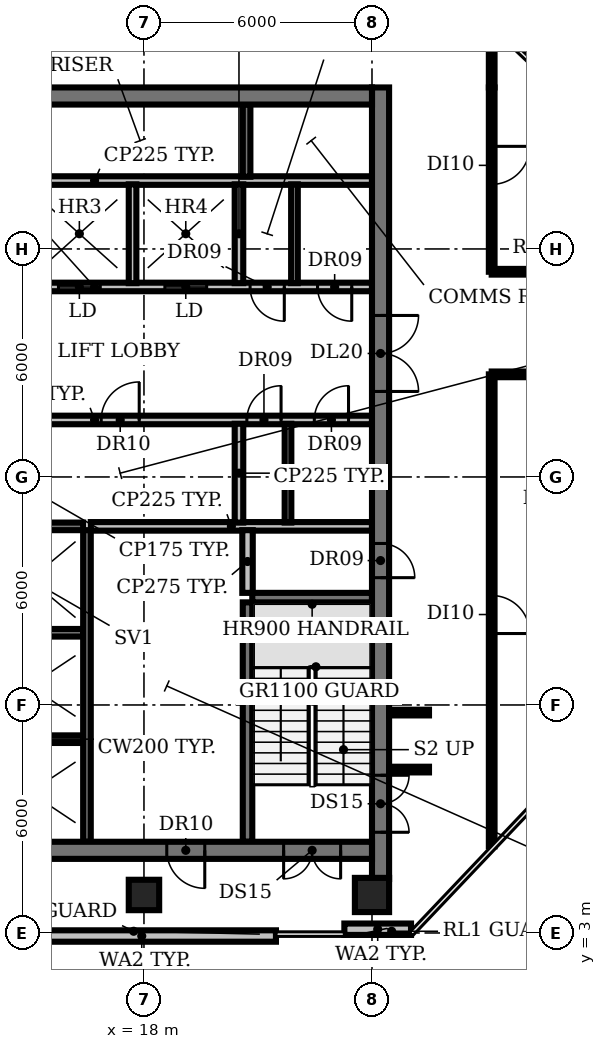
"""IFC4 building model, lengths in metres.
Left out: names, types, materials, properties, quantities, classifications, styles, units other than length and angle.
Written with IfcOpenShell. Run it as: python <this file> out.ifc"""

import sys

from ifc_helpers import new_model, si_unit, direction, frame, frame_2d, origin, origin_2d, place, context, subcontext, project, spatial, rectangle, circle, extrude, element, fill, save


model = new_model("IFC4")
c1 = context("Model", 3, precision=1e-05, world=origin(), true_north=direction((0.0, 1.0)))
c2 = subcontext(c1, "Body", "Model", "MODEL_VIEW")
j1 = project(units=[si_unit("LENGTHUNIT", "METRE"), si_unit("PLANEANGLEUNIT", "RADIAN")], contexts=[c1])
p1 = place(None, origin())
s1 = spatial("IfcSite", under=j1, at=p1, CompositionType="ELEMENT")
p2 = place(p1, origin())
s2 = spatial("IfcBuilding", under=s1, at=p2, CompositionType="ELEMENT")
p3 = place(p2, frame((0.0, 0.0, 222.2)))
s3 = spatial("IfcBuildingStorey", under=s2, at=p3, CompositionType="ELEMENT", Elevation=222.2)
p4 = place(p3, frame((18.0, 4.0, 0.0), z_axis=(0.0, 0.0, 1.0), x_axis=(1.0, 0.0, 0.0)))
e1 = element("IfcColumn", 1, at=p4, inside=s3, PredefinedType="COLUMN", context=c2, shape_type="SweptSolid", body=[
    extrude(rectangle(XDim=0.8, YDim=0.8, at=origin_2d()), origin(), (0.0, 0.0, 1.0), 3.85),
])
p5 = place(p3, frame((24.0, 4.0, 0.0), z_axis=(0.0, 0.0, 1.0), x_axis=(1.0, 0.0, 0.0)))
e2 = element("IfcColumn", 2, at=p5, inside=s3, PredefinedType="COLUMN", context=c2, shape_type="SweptSolid", body=[
    extrude(circle(Radius=0.45, at=origin_2d()), origin(), (0.0, 0.0, 1.0), 3.85),
])
p6 = place(p3, frame((14.41, 2.92, 0.0), z_axis=(0.0, 0.0, 1.0), x_axis=(1.0, 0.0, 0.0)))
e3 = element("IfcWall", 3, at=p6, inside=s3, PredefinedType="SOLIDWALL", context=c2, shape_type="SweptSolid", body=[
    extrude(rectangle(XDim=7.063, YDim=0.3, at=frame_2d((3.531, 0.0))), origin(), (0.0, 0.0, 1.0), 3.85),
])
p7 = place(p3, frame((23.273, 3.099, 0.0), z_axis=(0.0, 0.0, 1.0), x_axis=(1.0, 0.0, 0.0)))
e4 = element("IfcWall", 4, at=p7, inside=s3, PredefinedType="SOLIDWALL", context=c2, shape_type="SweptSolid", body=[
    extrude(rectangle(XDim=1.754, YDim=0.3, at=frame_2d((0.877, 0.0))), origin(), (0.0, 0.0, 1.0), 3.85),
])
for number, where, z_axis, x_axis in (
    (5, (13.6, 8.1, 0.0), (0.0, 0.0, 1.0), (1.0, 0.0, 0.0)),
    (6, (13.6, 10.9, 0.0), (0.0, 0.0, 1.0), (1.0, 0.0, 0.0)),
):
    element("IfcWall", number, at=place(p3, frame(where, z_axis=z_axis, x_axis=x_axis)), inside=s3, PredefinedType="SHEAR", context=c2, shape_type="SweptSolid", body=[
        extrude(rectangle(XDim=2.8, YDim=0.2, at=frame_2d((1.4, 0.0))), origin(), (0.0, 0.0, 1.0), 3.85),
    ])
p8 = place(p3, frame((20.85, 11.825, 0.0), z_axis=(0.0, 0.0, 1.0), x_axis=(1.0, 0.0, 0.0)))
e7 = element("IfcWall", 7, at=p8, inside=s3, PredefinedType="SHEAR", context=c2, shape_type="SweptSolid", body=[
    extrude(rectangle(XDim=3.15, YDim=0.25, at=frame_2d((1.575, 0.0))), origin(), (0.0, 0.0, 1.0), 3.85),
])
p9 = place(p3, frame((13.6, 13.7, 0.0), z_axis=(0.0, 0.0, 1.0), x_axis=(1.0, 0.0, 0.0)))
e8 = element("IfcWall", 8, at=p9, inside=s3, PredefinedType="SHEAR", context=c2, shape_type="SweptSolid", body=[
    extrude(rectangle(XDim=2.8, YDim=0.2, at=frame_2d((1.4, 0.0))), origin(), (0.0, 0.0, 1.0), 3.85),
])
p10 = place(p3, frame((16.6, 13.7, 0.0), z_axis=(0.0, 0.0, 1.0), x_axis=(1.0, 0.0, 0.0)))
e9 = element("IfcWall", 9, at=p10, inside=s3, PredefinedType="PARTITIONING", context=c2, shape_type="SweptSolid", body=[
    extrude(rectangle(XDim=7.4, YDim=0.225, at=frame_2d((3.7, 0.0))), origin(), (0.0, 0.0, 1.0), 3.85),
])
p11 = place(p3, frame((9.4, 16.5, 0.0), z_axis=(0.0, 0.0, 1.0), x_axis=(1.0, 0.0, 0.0)))
e10 = element("IfcWall", 10, at=p11, inside=s3, PredefinedType="PARTITIONING", context=c2, shape_type="SweptSolid", body=[
    extrude(rectangle(XDim=14.6, YDim=0.225, at=frame_2d((7.3, 0.0))), origin(), (0.0, 0.0, 1.0), 3.85),
])
p12 = place(p11, frame((1.9, 0.0, 0.0)))
e11 = element("IfcOpeningElement", 11, at=p12, cuts=e10, PredefinedType="OPENING", context=c2, shape_type="SweptSolid", body=[
    extrude(rectangle(XDim=1.0, YDim=2.1, at=frame_2d((0.5, 1.05))), frame((0.0, 0.123, 0.0), z_axis=(0.0, -1.0, 0.0), x_axis=(1.0, 0.0, 0.0)), (0.0, 0.0, 1.0), 0.245),
])
p13 = place(p11, frame((7.475, 0.0, 0.0)))
e12 = element("IfcOpeningElement", 12, at=p13, cuts=e10, PredefinedType="OPENING", context=c2, shape_type="SweptSolid", body=[
    extrude(rectangle(XDim=1.0, YDim=2.1, at=frame_2d((0.5, 1.05))), frame((0.0, 0.123, 0.0), z_axis=(0.0, -1.0, 0.0), x_axis=(1.0, 0.0, 0.0)), (0.0, 0.0, 1.0), 0.245),
])
p14 = place(p11, frame((11.308, 0.0, 0.0)))
e13 = element("IfcOpeningElement", 13, at=p14, cuts=e10, PredefinedType="OPENING", context=c2, shape_type="SweptSolid", body=[
    extrude(rectangle(XDim=0.9, YDim=2.1, at=frame_2d((0.45, 1.05))), frame((0.0, 0.123, 0.0), z_axis=(0.0, -1.0, 0.0), x_axis=(1.0, 0.0, 0.0)), (0.0, 0.0, 1.0), 0.245),
])
p15 = place(p11, frame((13.083, 0.0, 0.0)))
e14 = element("IfcOpeningElement", 14, at=p15, cuts=e10, PredefinedType="OPENING", context=c2, shape_type="SweptSolid", body=[
    extrude(rectangle(XDim=0.9, YDim=2.1, at=frame_2d((0.45, 1.05))), frame((0.0, 0.123, 0.0), z_axis=(0.0, -1.0, 0.0), x_axis=(1.0, 0.0, 0.0)), (0.0, 0.0, 1.0), 0.245),
])
p16 = place(p3, frame((24.0, 20.0, 0.0), z_axis=(0.0, 0.0, 1.0), x_axis=(-1.0, 0.0, 0.0)))
e15 = element("IfcWall", 15, at=p16, inside=s3, PredefinedType="PARTITIONING", context=c2, shape_type="SweptSolid", body=[
    extrude(rectangle(XDim=14.6, YDim=0.225, at=frame_2d((7.3, 0.0))), origin(), (0.0, 0.0, 1.0), 3.85),
])
p17 = place(p16, frame((12.75, 0.0, 0.0)))
e16 = element("IfcOpeningElement", 16, at=p17, cuts=e15, PredefinedType="OPENING", context=c2, shape_type="SweptSolid", body=[
    extrude(rectangle(XDim=1.1, YDim=2.1, at=frame_2d((0.55, 1.05))), frame((0.0, 0.123, 0.0), z_axis=(0.0, -1.0, 0.0), x_axis=(1.0, 0.0, 0.0)), (0.0, 0.0, 1.0), 0.245),
])
p18 = place(p16, frame((9.95, 0.0, 0.0)))
e17 = element("IfcOpeningElement", 17, at=p18, cuts=e15, PredefinedType="OPENING", context=c2, shape_type="SweptSolid", body=[
    extrude(rectangle(XDim=1.1, YDim=2.1, at=frame_2d((0.55, 1.05))), frame((0.0, 0.123, 0.0), z_axis=(0.0, -1.0, 0.0), x_axis=(1.0, 0.0, 0.0)), (0.0, 0.0, 1.0), 0.245),
])
p19 = place(p16, frame((7.15, 0.0, 0.0)))
e18 = element("IfcOpeningElement", 18, at=p19, cuts=e15, PredefinedType="OPENING", context=c2, shape_type="SweptSolid", body=[
    extrude(rectangle(XDim=1.1, YDim=2.1, at=frame_2d((0.55, 1.05))), frame((0.0, 0.123, 0.0), z_axis=(0.0, -1.0, 0.0), x_axis=(1.0, 0.0, 0.0)), (0.0, 0.0, 1.0), 0.245),
])
p20 = place(p16, frame((4.35, 0.0, 0.0)))
e19 = element("IfcOpeningElement", 19, at=p20, cuts=e15, PredefinedType="OPENING", context=c2, shape_type="SweptSolid", body=[
    extrude(rectangle(XDim=1.1, YDim=2.1, at=frame_2d((0.55, 1.05))), frame((0.0, 0.123, 0.0), z_axis=(0.0, -1.0, 0.0), x_axis=(1.0, 0.0, 0.0)), (0.0, 0.0, 1.0), 0.245),
])
p21 = place(p16, frame((2.308, 0.0, 0.0)))
e20 = element("IfcOpeningElement", 20, at=p21, cuts=e15, PredefinedType="OPENING", context=c2, shape_type="SweptSolid", body=[
    extrude(rectangle(XDim=0.9, YDim=2.1, at=frame_2d((0.45, 1.05))), frame((0.0, 0.123, 0.0), z_axis=(0.0, -1.0, 0.0), x_axis=(1.0, 0.0, 0.0)), (0.0, 0.0, 1.0), 0.245),
])
p22 = place(p16, frame((0.532, 0.0, 0.0)))
e21 = element("IfcOpeningElement", 21, at=p22, cuts=e15, PredefinedType="OPENING", context=c2, shape_type="SweptSolid", body=[
    extrude(rectangle(XDim=0.9, YDim=2.1, at=frame_2d((0.45, 1.05))), frame((0.0, 0.123, 0.0), z_axis=(0.0, -1.0, 0.0), x_axis=(1.0, 0.0, 0.0)), (0.0, 0.0, 1.0), 0.245),
])
p23 = place(p3, frame((9.4, 22.8, 0.0), z_axis=(0.0, 0.0, 1.0), x_axis=(1.0, 0.0, 0.0)))
e22 = element("IfcWall", 22, at=p23, inside=s3, PredefinedType="PARTITIONING", context=c2, shape_type="SweptSolid", body=[
    extrude(rectangle(XDim=14.6, YDim=0.225, at=frame_2d((7.3, 0.0))), origin(), (0.0, 0.0, 1.0), 3.85),
])
p24 = place(p3, frame((16.5, 5.4, 0.0), z_axis=(0.0, 0.0, 1.0), x_axis=(0.0, 1.0, 0.0)))
e23 = element("IfcWall", 23, at=p24, inside=s3, PredefinedType="SHEAR", context=c2, shape_type="SweptSolid", body=[
    extrude(rectangle(XDim=8.2, YDim=0.2, at=frame_2d((4.1, 0.0))), origin(), (0.0, 0.0, 1.0), 3.85),
])
p25 = place(p3, frame((17.7, 20.1, 0.0), z_axis=(0.0, 0.0, 1.0), x_axis=(0.0, 1.0, 0.0)))
e24 = element("IfcWall", 24, at=p25, inside=s3, PredefinedType="SOLIDWALL", context=c2, shape_type="SweptSolid", body=[
    extrude(rectangle(XDim=2.6, YDim=0.2, at=frame_2d((1.3, 0.0))), origin(), (0.0, 0.0, 1.0), 3.85),
])
for number, where, z_axis, x_axis in (
    (25, (20.5, 13.8, 0.0), (0.0, 0.0, 1.0), (0.0, 1.0, 0.0)),
    (26, (20.5, 20.1, 0.0), (0.0, 0.0, 1.0), (0.0, 1.0, 0.0)),
):
    element("IfcWall", number, at=place(p3, frame(where, z_axis=z_axis, x_axis=x_axis)), inside=s3, PredefinedType="PARTITIONING", context=c2, shape_type="SweptSolid", body=[
        extrude(rectangle(XDim=2.6, YDim=0.225, at=frame_2d((1.3, 0.0))), origin(), (0.0, 0.0, 1.0), 3.85),
    ])
p26 = place(p3, frame((20.7, 22.9, 0.0), z_axis=(0.0, 0.0, 1.0), x_axis=(0.0, 1.0, 0.0)))
e27 = element("IfcWall", 27, at=p26, inside=s3, PredefinedType="SHEAR", context=c2, shape_type="SweptSolid", body=[
    extrude(rectangle(XDim=1.9, YDim=0.2, at=frame_2d((0.95, 0.0))), origin(), (0.0, 0.0, 1.0), 3.85),
])
p27 = place(p3, frame((20.725, 5.4, 0.0), z_axis=(0.0, 0.0, 1.0), x_axis=(0.0, 1.0, 0.0)))
e28 = element("IfcWall", 28, at=p27, inside=s3, PredefinedType="SHEAR", context=c2, shape_type="SweptSolid", body=[
    extrude(rectangle(XDim=6.3, YDim=0.25, at=frame_2d((3.15, 0.0))), origin(), (0.0, 0.0, 1.0), 3.85),
])
p28 = place(p3, frame((20.725, 11.95, 0.0), z_axis=(0.0, 0.0, 1.0), x_axis=(0.0, 1.0, 0.0)))
e29 = element("IfcWall", 29, at=p28, inside=s3, PredefinedType="PARTITIONING", context=c2, shape_type="SweptSolid", body=[
    extrude(rectangle(XDim=1.65, YDim=0.275, at=frame_2d((0.825, 0.0))), origin(), (0.0, 0.0, 1.0), 3.85),
])
for number, where, z_axis, x_axis in (
    (30, (21.79, 13.8, 0.0), (0.0, 0.0, 1.0), (0.0, 1.0, 0.0)),
    (31, (21.96, 20.1, 0.0), (0.0, 0.0, 1.0), (0.0, 1.0, 0.0)),
):
    element("IfcWall", number, at=place(p3, frame(where, z_axis=z_axis, x_axis=x_axis)), inside=s3, PredefinedType="PARTITIONING", context=c2, shape_type="SweptSolid", body=[
        extrude(rectangle(XDim=2.6, YDim=0.175, at=frame_2d((1.3, 0.0))), origin(), (0.0, 0.0, 1.0), 3.85),
    ])
p29 = place(p3, frame((24.225, 25.25, 0.0), z_axis=(0.0, 0.0, 1.0), x_axis=(0.0, -1.0, 0.0)))
e32 = element("IfcWall", 32, at=p29, inside=s3, PredefinedType="SHEAR", context=c2, shape_type="SweptSolid", body=[
    extrude(rectangle(XDim=20.83, YDim=0.45, at=frame_2d((10.415, 0.0))), origin(), (0.0, 0.0, 1.0), 3.85),
])
p30 = place(p29, frame((18.1, 0.0, 0.0)))
e33 = element("IfcOpeningElement", 33, at=p30, cuts=e32, PredefinedType="OPENING", context=c2, shape_type="SweptSolid", body=[
    extrude(rectangle(XDim=1.5, YDim=2.1, at=frame_2d((0.75, 1.05))), frame((0.0, 0.235, 0.0), z_axis=(0.0, -1.0, 0.0), x_axis=(1.0, 0.0, 0.0)), (0.0, 0.0, 1.0), 0.47),
])
p31 = place(p29, frame((12.0, 0.0, 0.0)))
e34 = element("IfcOpeningElement", 34, at=p31, cuts=e32, PredefinedType="OPENING", context=c2, shape_type="SweptSolid", body=[
    extrude(rectangle(XDim=0.9, YDim=2.1, at=frame_2d((0.45, 1.05))), frame((0.0, 0.235, 0.0), z_axis=(0.0, -1.0, 0.0), x_axis=(1.0, 0.0, 0.0)), (0.0, 0.0, 1.0), 0.47),
])
p32 = place(p29, frame((6.0, 0.0, 0.0)))
e35 = element("IfcOpeningElement", 35, at=p32, cuts=e32, PredefinedType="OPENING", context=c2, shape_type="SweptSolid", body=[
    extrude(rectangle(XDim=2.0, YDim=2.1, at=frame_2d((1.0, 1.05))), frame((0.0, 0.235, 0.0), z_axis=(0.0, -1.0, 0.0), x_axis=(1.0, 0.0, 0.0)), (0.0, 0.0, 1.0), 0.47),
])
p33 = place(p3, frame((24.0, 5.175, 0.0), z_axis=(0.0, 0.0, 1.0), x_axis=(-1.0, 0.0, 0.0)))
e36 = element("IfcWall", 36, at=p33, inside=s3, PredefinedType="SHEAR", context=c2, shape_type="SweptSolid", body=[
    extrude(rectangle(XDim=18.0, YDim=0.45, at=frame_2d((9.0, 0.0))), origin(), (0.0, 0.0, 1.0), 3.85),
])
p34 = place(p33, frame((0.825, 0.0, 0.0)))
e37 = element("IfcOpeningElement", 37, at=p34, cuts=e36, PredefinedType="OPENING", context=c2, shape_type="SweptSolid", body=[
    extrude(rectangle(XDim=1.5, YDim=2.1, at=frame_2d((0.75, 1.05))), frame((0.0, 0.235, 0.0), z_axis=(0.0, -1.0, 0.0), x_axis=(1.0, 0.0, 0.0)), (0.0, 0.0, 1.0), 0.47),
])
p35 = place(p33, frame((15.675, 0.0, 0.0)))
e38 = element("IfcOpeningElement", 38, at=p35, cuts=e36, PredefinedType="OPENING", context=c2, shape_type="SweptSolid", body=[
    extrude(rectangle(XDim=1.5, YDim=2.1, at=frame_2d((0.75, 1.05))), frame((0.0, 0.235, 0.0), z_axis=(0.0, -1.0, 0.0), x_axis=(1.0, 0.0, 0.0)), (0.0, 0.0, 1.0), 0.47),
])
p36 = place(p33, frame((13.0, 0.0, 0.0)))
e39 = element("IfcOpeningElement", 39, at=p36, cuts=e36, PredefinedType="OPENING", context=c2, shape_type="SweptSolid", body=[
    extrude(rectangle(XDim=1.2, YDim=2.1, at=frame_2d((0.6, 1.05))), frame((0.0, 0.235, 0.0), z_axis=(0.0, -1.0, 0.0), x_axis=(1.0, 0.0, 0.0)), (0.0, 0.0, 1.0), 0.47),
])
p37 = place(p33, frame((4.4, 0.0, 0.0)))
e40 = element("IfcOpeningElement", 40, at=p37, cuts=e36, PredefinedType="OPENING", context=c2, shape_type="SweptSolid", body=[
    extrude(rectangle(XDim=1.0, YDim=2.1, at=frame_2d((0.5, 1.05))), frame((0.0, 0.235, 0.0), z_axis=(0.0, -1.0, 0.0), x_axis=(1.0, 0.0, 0.0)), (0.0, 0.0, 1.0), 0.47),
])
p38 = place(p3, frame((6.0, 25.025, 0.0), z_axis=(0.0, 0.0, 1.0), x_axis=(1.0, 0.0, 0.0)))
e41 = element("IfcWall", 41, at=p38, inside=s3, PredefinedType="SHEAR", context=c2, shape_type="SweptSolid", body=[
    extrude(rectangle(XDim=18.0, YDim=0.45, at=frame_2d((9.0, 0.0))), origin(), (0.0, 0.0, 1.0), 3.85),
])
for number, where, z_axis, x_axis in (
    (42, (24.45, 7.3, 0.0), (0.0, 0.0, 1.0), (1.0, 0.0, 0.0)),
    (43, (24.45, 8.8, 0.0), (0.0, 0.0, 1.0), (1.0, 0.0, 0.0)),
):
    element("IfcWall", number, at=place(p3, frame(where, z_axis=z_axis, x_axis=x_axis)), inside=s3, PredefinedType="PARTITIONING", context=c2, shape_type="SweptSolid", body=[
        extrude(rectangle(XDim=1.05, YDim=0.15, at=frame_2d((0.525, 0.0))), origin(), (0.0, 0.0, 1.0), 2.88),
    ])
p39 = place(p3, frame((27.15, 17.7, 0.0), z_axis=(0.0, 0.0, 1.0), x_axis=(0.0, -1.0, 0.0)))
e44 = element("IfcWall", 44, at=p39, inside=s3, PredefinedType="PARTITIONING", context=c2, shape_type="SweptSolid", body=[
    extrude(rectangle(XDim=12.42, YDim=0.15, at=frame_2d((6.21, 0.0))), origin(), (0.0, 0.0, 1.0), 2.88),
])
p40 = place(p39, frame((5.82, 0.0, 0.0)))
e45 = element("IfcOpeningElement", 45, at=p40, cuts=e44, PredefinedType="OPENING", context=c2, shape_type="SweptSolid", body=[
    extrude(rectangle(XDim=1.0, YDim=2.1, at=frame_2d((0.5, 1.05))), frame((0.0, 0.085, 0.0), z_axis=(0.0, -1.0, 0.0), x_axis=(1.0, 0.0, 0.0)), (0.0, 0.0, 1.0), 0.17),
])
p41 = place(p3, frame((27.15, 17.7, 0.0), z_axis=(0.0, 0.0, 1.0), x_axis=(1.0, 0.0, 0.0)))
e46 = element("IfcWall", 46, at=p41, inside=s3, PredefinedType="PARTITIONING", context=c2, shape_type="SweptSolid", body=[
    extrude(rectangle(XDim=4.435, YDim=0.15, at=frame_2d((2.218, 0.0))), origin(), (0.0, 0.0, 1.0), 2.88),
])
p42 = place(p3, frame((27.15, 20.4, 0.0), z_axis=(0.0, 0.0, 1.0), x_axis=(1.0, 0.0, 0.0)))
e47 = element("IfcWall", 47, at=p42, inside=s3, PredefinedType="PARTITIONING", context=c2, shape_type="SweptSolid", body=[
    extrude(rectangle(XDim=4.236, YDim=0.15, at=frame_2d((2.118, 0.0))), origin(), (0.0, 0.0, 1.0), 2.88),
])
p43 = place(p3, frame((27.15, 25.25, 0.0), z_axis=(0.0, 0.0, 1.0), x_axis=(0.0, -1.0, 0.0)))
e48 = element("IfcWall", 48, at=p43, inside=s3, PredefinedType="PARTITIONING", context=c2, shape_type="SweptSolid", body=[
    extrude(rectangle(XDim=4.85, YDim=0.15, at=frame_2d((2.425, 0.0))), origin(), (0.0, 0.0, 1.0), 2.88),
])
p44 = place(p43, frame((1.55, 0.0, 0.0)))
e49 = element("IfcOpeningElement", 49, at=p44, cuts=e48, PredefinedType="OPENING", context=c2, shape_type="SweptSolid", body=[
    extrude(rectangle(XDim=1.0, YDim=2.1, at=frame_2d((0.5, 1.05))), frame((0.0, 0.085, 0.0), z_axis=(0.0, -1.0, 0.0), x_axis=(1.0, 0.0, 0.0)), (0.0, 0.0, 1.0), 0.17),
])
p45 = place(p3, frame((27.15, 25.25, 0.0), z_axis=(0.0, 0.0, 1.0), x_axis=(0.0, 1.0, 0.0)))
e50 = element("IfcWall", 50, at=p45, inside=s3, PredefinedType="PARTITIONING", context=c2, shape_type="SweptSolid", body=[
    extrude(rectangle(XDim=1.58, YDim=0.15, at=frame_2d((0.79, 0.0))), origin(), (0.0, 0.0, 1.0), 2.88),
])
p46 = place(p13, origin())
e51 = element("IfcDoor", 51, at=p46, inside=s3, OperationType="SINGLE_SWING_RIGHT", PredefinedType="DOOR", context=c2, shape_type="SweptSolid", body=[
    extrude(rectangle(XDim=1.0, YDim=2.1, at=frame_2d((0.5, 1.05))), frame((0.0, 0.025, 0.0), z_axis=(0.0, -1.0, 0.0), x_axis=(1.0, 0.0, 0.0)), (0.0, 0.0, 1.0), 0.05),
])
fill(e12, e51)
p47 = place(p14, origin())
e52 = element("IfcDoor", 52, at=p47, inside=s3, OperationType="SINGLE_SWING_RIGHT", PredefinedType="DOOR", context=c2, shape_type="SweptSolid", body=[
    extrude(rectangle(XDim=0.9, YDim=2.1, at=frame_2d((0.45, 1.05))), frame((0.0, 0.025, 0.0), z_axis=(0.0, -1.0, 0.0), x_axis=(1.0, 0.0, 0.0)), (0.0, 0.0, 1.0), 0.05),
])
fill(e13, e52)
p48 = place(p15, origin())
e53 = element("IfcDoor", 53, at=p48, inside=s3, OperationType="SINGLE_SWING_RIGHT", PredefinedType="DOOR", context=c2, shape_type="SweptSolid", body=[
    extrude(rectangle(XDim=0.9, YDim=2.1, at=frame_2d((0.45, 1.05))), frame((0.0, 0.025, 0.0), z_axis=(0.0, -1.0, 0.0), x_axis=(1.0, 0.0, 0.0)), (0.0, 0.0, 1.0), 0.05),
])
fill(e14, e53)
p49 = place(p19, origin())
e54 = element("IfcDoor", 54, at=p49, inside=s3, OperationType="DOUBLE_DOOR_SLIDING", PredefinedType="DOOR", context=c2, shape_type="SweptSolid", body=[
    extrude(rectangle(XDim=1.1, YDim=2.1, at=frame_2d((0.55, 1.05))), frame((0.0, 0.025, 0.0), z_axis=(0.0, -1.0, 0.0), x_axis=(1.0, 0.0, 0.0)), (0.0, 0.0, 1.0), 0.05),
])
fill(e18, e54)
p50 = place(p20, origin())
e55 = element("IfcDoor", 55, at=p50, inside=s3, OperationType="DOUBLE_DOOR_SLIDING", PredefinedType="DOOR", context=c2, shape_type="SweptSolid", body=[
    extrude(rectangle(XDim=1.1, YDim=2.1, at=frame_2d((0.55, 1.05))), frame((0.0, 0.025, 0.0), z_axis=(0.0, -1.0, 0.0), x_axis=(1.0, 0.0, 0.0)), (0.0, 0.0, 1.0), 0.05),
])
fill(e19, e55)
p51 = place(p21, origin())
e56 = element("IfcDoor", 56, at=p51, inside=s3, OperationType="SINGLE_SWING_LEFT", PredefinedType="DOOR", context=c2, shape_type="SweptSolid", body=[
    extrude(rectangle(XDim=0.9, YDim=2.1, at=frame_2d((0.45, 1.05))), frame((0.0, 0.025, 0.0), z_axis=(0.0, -1.0, 0.0), x_axis=(1.0, 0.0, 0.0)), (0.0, 0.0, 1.0), 0.05),
])
fill(e20, e56)
p52 = place(p22, origin())
e57 = element("IfcDoor", 57, at=p52, inside=s3, OperationType="SINGLE_SWING_LEFT", PredefinedType="DOOR", context=c2, shape_type="SweptSolid", body=[
    extrude(rectangle(XDim=0.9, YDim=2.1, at=frame_2d((0.45, 1.05))), frame((0.0, 0.025, 0.0), z_axis=(0.0, -1.0, 0.0), x_axis=(1.0, 0.0, 0.0)), (0.0, 0.0, 1.0), 0.05),
])
fill(e21, e57)
p53 = place(p30, origin())
e58 = element("IfcDoor", 58, at=p53, inside=s3, OperationType="DOUBLE_DOOR_SINGLE_SWING", PredefinedType="DOOR", context=c2, shape_type="SweptSolid", body=[
    extrude(rectangle(XDim=1.5, YDim=2.1, at=frame_2d((0.75, 1.05))), frame((0.0, 0.025, 0.0), z_axis=(0.0, -1.0, 0.0), x_axis=(1.0, 0.0, 0.0)), (0.0, 0.0, 1.0), 0.05),
])
fill(e33, e58)
p54 = place(p31, origin())
e59 = element("IfcDoor", 59, at=p54, inside=s3, OperationType="SINGLE_SWING_RIGHT", PredefinedType="DOOR", context=c2, shape_type="SweptSolid", body=[
    extrude(rectangle(XDim=0.9, YDim=2.1, at=frame_2d((0.45, 1.05))), frame((0.0, 0.025, 0.0), z_axis=(0.0, -1.0, 0.0), x_axis=(1.0, 0.0, 0.0)), (0.0, 0.0, 1.0), 0.05),
])
fill(e34, e59)
p55 = place(p32, origin())
e60 = element("IfcDoor", 60, at=p55, inside=s3, OperationType="DOUBLE_DOOR_SINGLE_SWING", PredefinedType="DOOR", context=c2, shape_type="SweptSolid", body=[
    extrude(rectangle(XDim=2.0, YDim=2.1, at=frame_2d((1.0, 1.05))), frame((0.0, 0.025, 0.0), z_axis=(0.0, -1.0, 0.0), x_axis=(1.0, 0.0, 0.0)), (0.0, 0.0, 1.0), 0.05),
])
fill(e35, e60)
p56 = place(p34, origin())
e61 = element("IfcDoor", 61, at=p56, inside=s3, OperationType="DOUBLE_DOOR_SINGLE_SWING", PredefinedType="DOOR", context=c2, shape_type="SweptSolid", body=[
    extrude(rectangle(XDim=1.5, YDim=2.1, at=frame_2d((0.75, 1.05))), frame((0.0, 0.025, 0.0), z_axis=(0.0, -1.0, 0.0), x_axis=(1.0, 0.0, 0.0)), (0.0, 0.0, 1.0), 0.05),
])
fill(e37, e61)
p57 = place(p37, origin())
e62 = element("IfcDoor", 62, at=p57, inside=s3, OperationType="SINGLE_SWING_LEFT", PredefinedType="DOOR", context=c2, shape_type="SweptSolid", body=[
    extrude(rectangle(XDim=1.0, YDim=2.1, at=frame_2d((0.5, 1.05))), frame((0.0, 0.025, 0.0), z_axis=(0.0, -1.0, 0.0), x_axis=(1.0, 0.0, 0.0)), (0.0, 0.0, 1.0), 0.05),
])
fill(e40, e62)
p58 = place(p40, origin())
e63 = element("IfcDoor", 63, at=p58, inside=s3, OperationType="SINGLE_SWING_RIGHT", PredefinedType="DOOR", context=c2, shape_type="SweptSolid", body=[
    extrude(rectangle(XDim=1.0, YDim=2.1, at=frame_2d((0.5, 1.05))), frame((0.0, 0.025, 0.0), z_axis=(0.0, -1.0, 0.0), x_axis=(1.0, 0.0, 0.0)), (0.0, 0.0, 1.0), 0.05),
])
fill(e45, e63)
p59 = place(p44, origin())
e64 = element("IfcDoor", 64, at=p59, inside=s3, OperationType="SINGLE_SWING_LEFT", PredefinedType="DOOR", context=c2, shape_type="SweptSolid", body=[
    extrude(rectangle(XDim=1.0, YDim=2.1, at=frame_2d((0.5, 1.05))), frame((0.0, 0.025, 0.0), z_axis=(0.0, -1.0, 0.0), x_axis=(1.0, 0.0, 0.0)), (0.0, 0.0, 1.0), 0.05),
])
fill(e49, e64)
save(model, sys.argv[1])
